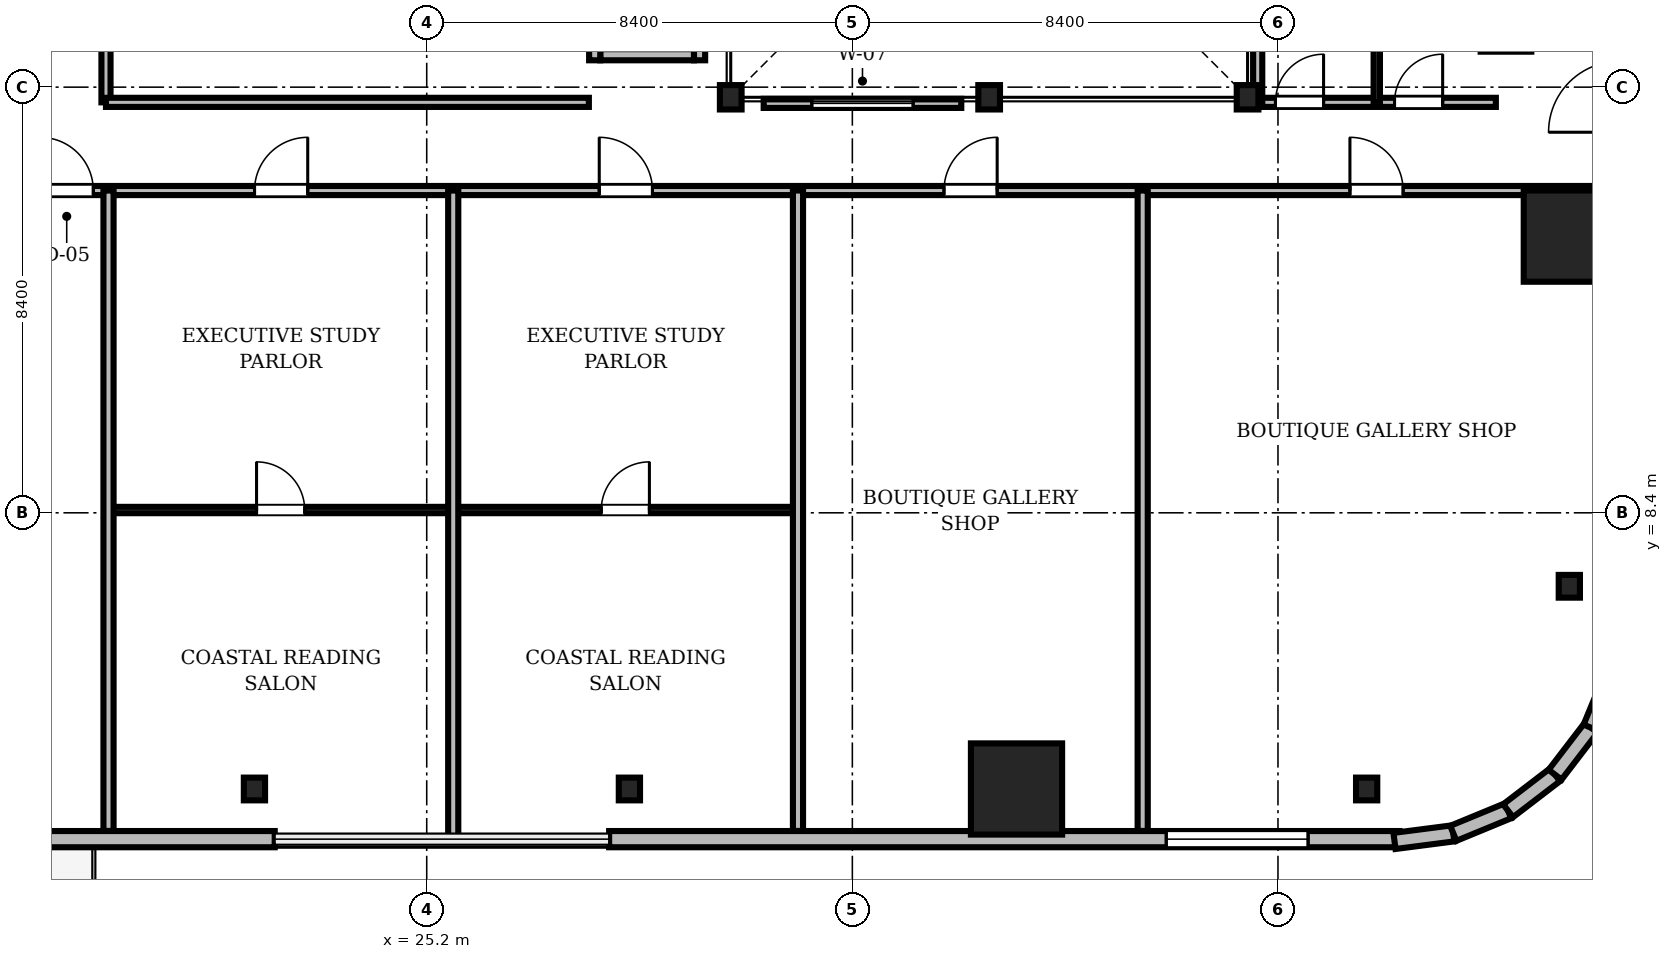
"""IFC4 building model, lengths in metres.
Left out: names, types, materials, properties, quantities, classifications, styles, units other than length and angle.
Written with IfcOpenShell. Run it as: python <this file> out.ifc"""

import sys

from ifc_helpers import new_model, si_unit, direction, frame, frame_2d, origin, origin_2d, place, context, subcontext, project, spatial, rectangle, i_section, extrude, source, transform, mapped, element, fill, save


model = new_model("IFC4")
c1 = context("Model", 3, precision=1e-05, world=origin(), true_north=direction((0.0, 1.0)))
c2 = subcontext(c1, "Body", "Model", "MODEL_VIEW")
j1 = project(units=[si_unit("LENGTHUNIT", "METRE"), si_unit("PLANEANGLEUNIT", "RADIAN")], contexts=[c1])
p1 = place(None, origin())
s1 = spatial("IfcSite", under=j1, at=p1, CompositionType="ELEMENT")
p2 = place(p1, origin())
s2 = spatial("IfcBuilding", under=s1, at=p2, CompositionType="ELEMENT")
p3 = place(p2, frame((0.0, 0.0, 78.7)))
s3 = spatial("IfcBuildingStorey", under=s2, at=p3, CompositionType="ELEMENT", Elevation=78.7)
m1 = source(origin(), c2, "Body", "SweptSolid", [
    extrude(i_section(OverallWidth=0.428, OverallDepth=0.481, WebThickness=0.04, FlangeThickness=0.063, FilletRadius=0.015, at=origin_2d()), origin(), (0.0, 0.0, 1.0), 3.41),
])
for number, where, z_axis, x_axis in (
    (1, (31.2, 16.6, 0.0), (0.0, 0.0, 1.0), (1.0, 0.0, 0.0)),
    (2, (36.3, 16.6, 0.0), (0.0, 0.0, 1.0), (1.0, 0.0, 0.0)),
    (3, (41.4, 16.6, 0.0), (0.0, 0.0, 1.0), (1.0, 0.0, 0.0)),
):
    element("IfcColumn", number, at=place(p3, frame(where, z_axis=z_axis, x_axis=x_axis)), inside=s3, PredefinedType="COLUMN", context=c2, shape_type="MappedRepresentation", body=[
        mapped(m1, transform((0.0, 0.0, 0.0), scale=1.0)),
    ])
m2 = source(origin(), c2, "Body", "SweptSolid", [
    extrude(rectangle(XDim=1.8, YDim=1.8, at=origin_2d()), origin(), (0.0, 0.0, 1.0), 3.41),
])
for number, where, z_axis, x_axis in (
    (4, (36.84, 2.95, 0.0), (0.0, 0.0, 1.0), (1.0, 0.0, 0.0)),
    (5, (47.75, 13.86, 0.0), (0.0, 0.0, 1.0), (1.0, 0.0, 0.0)),
):
    element("IfcColumn", number, at=place(p3, frame(where, z_axis=z_axis, x_axis=x_axis)), inside=s3, PredefinedType="COLUMN", context=c2, shape_type="MappedRepresentation", body=[
        mapped(m2, transform((0.0, 0.0, 0.0), scale=1.0)),
    ])
m3 = source(origin(), c2, "Body", "SweptSolid", [
    extrude(i_section(OverallWidth=0.419, OverallDepth=0.449, WebThickness=0.031, FlangeThickness=0.048, FilletRadius=0.015, at=origin_2d()), origin(), (0.0, 0.0, 1.0), 3.41),
])
for number, where, z_axis, x_axis in (
    (6, (21.8, 2.95, 0.0), (0.0, 0.0, 1.0), (1.0, 0.0, 0.0)),
    (7, (29.2, 2.95, 0.0), (0.0, 0.0, 1.0), (1.0, 0.0, 0.0)),
    (8, (43.75, 2.95, 0.0), (0.0, 0.0, 1.0), (1.0, 0.0, 0.0)),
    (9, (47.75, 6.95, 0.0), (0.0, 0.0, 1.0), (1.0, 0.0, 0.0)),
):
    element("IfcColumn", number, at=place(p3, frame(where, z_axis=z_axis, x_axis=x_axis)), inside=s3, PredefinedType="COLUMN", context=c2, shape_type="MappedRepresentation", body=[
        mapped(m3, transform((0.0, 0.0, 0.0), scale=1.0)),
    ])
m4 = source(origin(), c2, "Body", "SweptSolid", [
    extrude(rectangle(XDim=15.6, YDim=0.32, at=frame_2d((7.8, 0.0))), origin(), (0.0, 0.0, 1.0), 3.41),
])
p4 = place(p3, frame((6.6, 1.96, 0.0), z_axis=(0.0, 0.0, 1.0), x_axis=(1.0, 0.0, 0.0)))
e10 = element("IfcWall", 10, at=p4, inside=s3, PredefinedType="SOLIDWALL", context=c2, shape_type="MappedRepresentation", body=[
    mapped(m4, transform((0.0, 0.0, 0.0), scale=1.0)),
])
m5 = source(origin(), c2, "Body", "SweptSolid", [
    extrude(rectangle(XDim=1.4, YDim=2.3, at=frame_2d((0.7, 1.15))), frame((0.0, 0.17, 0.0), z_axis=(0.0, -1.0, 0.0), x_axis=(1.0, 0.0, 0.0)), (0.0, 0.0, 1.0), 0.34),
])
p5 = place(p4, frame((9.61, 0.0, 0.0)))
e11 = element("IfcOpeningElement", 11, at=p5, cuts=e10, PredefinedType="OPENING", context=c2, shape_type="MappedRepresentation", body=[
    mapped(m5, transform((0.0, 0.0, 0.0), scale=1.0)),
])
m6 = source(origin(), c2, "Body", "SweptSolid", [
    extrude(rectangle(XDim=2.8, YDim=2.4, at=frame_2d((1.4, 1.2))), frame((0.0, 0.17, 0.0), z_axis=(0.0, -1.0, 0.0), x_axis=(1.0, 0.0, 0.0)), (0.0, 0.0, 1.0), 0.34),
])
p6 = place(p4, frame((2.705, 0.0, 0.72)))
e12 = element("IfcOpeningElement", 12, at=p6, cuts=e10, PredefinedType="OPENING", context=c2, shape_type="MappedRepresentation", body=[
    mapped(m6, transform((0.0, 0.0, 0.0), scale=1.0)),
])
p7 = place(p3, frame((28.8, 1.96, 0.0), z_axis=(0.0, 0.0, 1.0), x_axis=(1.0, 0.0, 0.0)))
e13 = element("IfcWall", 13, at=p7, inside=s3, PredefinedType="SOLIDWALL", context=c2, shape_type="MappedRepresentation", body=[
    mapped(m4, transform((0.0, 0.0, 0.0), scale=1.0)),
])
p8 = place(p7, frame((10.995, 0.0, 0.72)))
e14 = element("IfcOpeningElement", 14, at=p8, cuts=e13, PredefinedType="OPENING", context=c2, shape_type="MappedRepresentation", body=[
    mapped(m6, transform((0.0, 0.0, 0.0), scale=1.0)),
])
m7 = source(origin(), c2, "Body", "SweptSolid", [
    extrude(rectangle(XDim=1.17, YDim=0.32, at=frame_2d((0.585, 0.0))), origin(), (0.0, 0.0, 1.0), 3.41),
])
p9 = place(p3, frame((44.3, 1.925, 0.0), z_axis=(0.0, 0.0, 1.0), x_axis=(0.991762485493, 0.128090485085, 0.0)))
e15 = element("IfcWall", 15, at=p9, inside=s3, PredefinedType="SOLIDWALL", context=c2, shape_type="MappedRepresentation", body=[
    mapped(m7, transform((0.0, 0.0, 0.0), scale=1.0)),
])
m8 = source(origin(), c2, "Body", "SweptSolid", [
    extrude(rectangle(XDim=1.169, YDim=0.32, at=frame_2d((0.585, 0.0))), origin(), (0.0, 0.0, 1.0), 3.41),
])
p10 = place(p3, frame((45.46, 2.074, 0.0), z_axis=(0.0, 0.0, 1.0), x_axis=(0.924479075121, 0.381232789334, 0.0)))
e16 = element("IfcWall", 16, at=p10, inside=s3, PredefinedType="SOLIDWALL", context=c2, shape_type="MappedRepresentation", body=[
    mapped(m8, transform((0.0, 0.0, 0.0), scale=1.0)),
])
m9 = source(origin(), c2, "Body", "SweptSolid", [
    extrude(rectangle(XDim=1.169, YDim=0.32, at=frame_2d((0.584, 0.0))), origin(), (0.0, 0.0, 1.0), 3.41),
])
p11 = place(p3, frame((46.541, 2.52, 0.0), z_axis=(0.0, 0.0, 1.0), x_axis=(0.793663520347, 0.608356981114, 0.0)))
e17 = element("IfcWall", 17, at=p11, inside=s3, PredefinedType="SOLIDWALL", context=c2, shape_type="MappedRepresentation", body=[
    mapped(m9, transform((0.0, 0.0, 0.0), scale=1.0)),
])
m10 = source(origin(), c2, "Body", "SweptSolid", [
    extrude(rectangle(XDim=1.169, YDim=0.32, at=frame_2d((0.584, 0.0))), origin(), (0.0, 0.0, 1.0), 3.41),
])
for number, where, z_axis, x_axis in (
    (18, (47.469, 3.231, 0.0), (0.0, 0.0, 1.0), (0.608, 0.794, 0.0)),
    (19, (48.18, 4.159, 0.0), (0.0, 0.0, 1.0), (0.381, 0.925, 0.0)),
):
    element("IfcWall", number, at=place(p3, frame(where, z_axis=z_axis, x_axis=x_axis)), inside=s3, PredefinedType="SOLIDWALL", context=c2, shape_type="MappedRepresentation", body=[
        mapped(m10, transform((0.0, 0.0, 0.0), scale=1.0)),
    ])
m11 = source(origin(), c2, "Body", "SweptSolid", [
    extrude(rectangle(XDim=1.85, YDim=0.22, at=frame_2d((0.925, 0.0))), origin(), (0.0, 0.0, 1.0), 3.41),
])
p12 = place(p3, frame((28.625, 17.44, 0.0), z_axis=(0.0, 0.0, 1.0), x_axis=(1.0, 0.0, 0.0)))
e20 = element("IfcWall", 20, at=p12, inside=s3, PredefinedType="SOLIDWALL", context=c2, shape_type="MappedRepresentation", body=[
    mapped(m11, transform((0.0, 0.0, 0.0), scale=1.0)),
])
m12 = source(origin(), c2, "Body", "SweptSolid", [
    extrude(rectangle(XDim=2.54, YDim=0.22, at=frame_2d((1.27, 0.0))), origin(), (0.0, 0.0, 1.0), 3.41),
])
for number, where, z_axis, x_axis in (
    (21, (28.515, 17.33, 0.0), (0.0, 0.0, 1.0), (0.0, 1.0, 0.0)),
    (22, (30.585, 17.33, 0.0), (0.0, 0.0, 1.0), (0.0, 1.0, 0.0)),
):
    element("IfcWall", number, at=place(p3, frame(where, z_axis=z_axis, x_axis=x_axis)), inside=s3, PredefinedType="SOLIDWALL", context=c2, shape_type="MappedRepresentation", body=[
        mapped(m12, transform((0.0, 0.0, 0.0), scale=1.0)),
    ])
m13 = source(origin(), c2, "Body", "SweptSolid", [
    extrude(rectangle(XDim=46.156, YDim=0.18, at=frame_2d((23.078, 0.0))), origin(), (0.0, 0.0, 1.0), 2.652),
])
p13 = place(p3, frame((2.422, 14.76, 0.0), z_axis=(0.0, 0.0, 1.0), x_axis=(1.0, 0.0, 0.0)))
e23 = element("IfcWall", 23, at=p13, inside=s3, PredefinedType="PARTITIONING", context=c2, shape_type="MappedRepresentation", body=[
    mapped(m13, transform((0.0, 0.0, 0.0), scale=1.0)),
])
m14 = source(origin(), c2, "Body", "SweptSolid", [
    extrude(rectangle(XDim=1.05, YDim=2.2, at=frame_2d((0.525, 1.1))), frame((0.0, 0.1, 0.0), z_axis=(0.0, -1.0, 0.0), x_axis=(1.0, 0.0, 0.0)), (0.0, 0.0, 1.0), 0.2),
])
p14 = place(p13, frame((15.148, 0.0, 0.0)))
e24 = element("IfcOpeningElement", 24, at=p14, cuts=e23, PredefinedType="OPENING", context=c2, shape_type="MappedRepresentation", body=[
    mapped(m14, transform((0.0, 0.0, 0.0), scale=1.0)),
])
p15 = place(p13, frame((19.38, 0.0, 0.0)))
e25 = element("IfcOpeningElement", 25, at=p15, cuts=e23, PredefinedType="OPENING", context=c2, shape_type="MappedRepresentation", body=[
    mapped(m14, transform((0.0, 0.0, 0.0), scale=1.0)),
])
p16 = place(p13, frame((26.183, 0.0, 0.0)))
e26 = element("IfcOpeningElement", 26, at=p16, cuts=e23, PredefinedType="OPENING", context=c2, shape_type="MappedRepresentation", body=[
    mapped(m14, transform((0.0, 0.0, 0.0), scale=1.0)),
])
p17 = place(p13, frame((32.986, 0.0, 0.0)))
e27 = element("IfcOpeningElement", 27, at=p17, cuts=e23, PredefinedType="OPENING", context=c2, shape_type="MappedRepresentation", body=[
    mapped(m14, transform((0.0, 0.0, 0.0), scale=1.0)),
])
p18 = place(p13, frame((40.998, 0.0, 0.0)))
e28 = element("IfcOpeningElement", 28, at=p18, cuts=e23, PredefinedType="OPENING", context=c2, shape_type="MappedRepresentation", body=[
    mapped(m14, transform((0.0, 0.0, 0.0), scale=1.0)),
])
m15 = source(origin(), c2, "Body", "SweptSolid", [
    extrude(rectangle(XDim=6.804, YDim=0.125, at=frame_2d((3.402, 0.0))), origin(), (0.0, 0.0, 1.0), 2.802),
])
p19 = place(p3, frame((25.723, 8.455, 0.0), z_axis=(0.0, 0.0, 1.0), x_axis=(1.0, 0.0, 0.0)))
e29 = element("IfcWall", 29, at=p19, inside=s3, PredefinedType="PARTITIONING", context=c2, shape_type="MappedRepresentation", body=[
    mapped(m15, transform((0.0, 0.0, 0.0), scale=1.0)),
])
m16 = source(origin(), c2, "Body", "SweptSolid", [
    extrude(rectangle(XDim=0.95, YDim=2.15, at=frame_2d((0.475, 1.075))), frame((0.0, 0.073, 0.0), z_axis=(0.0, -1.0, 0.0), x_axis=(1.0, 0.0, 0.0)), (0.0, 0.0, 1.0), 0.145),
])
p20 = place(p19, frame((2.922, 0.0, 0.0)))
e30 = element("IfcOpeningElement", 30, at=p20, cuts=e29, PredefinedType="OPENING", context=c2, shape_type="MappedRepresentation", body=[
    mapped(m16, transform((0.0, 0.0, 0.0), scale=1.0)),
])
m17 = source(origin(), c2, "Body", "SweptSolid", [
    extrude(rectangle(XDim=6.803, YDim=0.125, at=frame_2d((3.401, 0.0))), origin(), (0.0, 0.0, 1.0), 2.802),
])
p21 = place(p3, frame((18.92, 8.455, 0.0), z_axis=(0.0, 0.0, 1.0), x_axis=(1.0, 0.0, 0.0)))
e31 = element("IfcWall", 31, at=p21, inside=s3, PredefinedType="PARTITIONING", context=c2, shape_type="MappedRepresentation", body=[
    mapped(m17, transform((0.0, 0.0, 0.0), scale=1.0)),
])
p22 = place(p21, frame((2.922, 0.0, 0.0)))
e32 = element("IfcOpeningElement", 32, at=p22, cuts=e31, PredefinedType="OPENING", context=c2, shape_type="MappedRepresentation", body=[
    mapped(m16, transform((0.0, 0.0, 0.0), scale=1.0)),
])
m18 = source(origin(), c2, "Body", "SweptSolid", [
    extrude(rectangle(XDim=4.7, YDim=0.18, at=frame_2d((2.35, 0.0))), origin(), (0.0, 0.0, 1.0), 2.802),
])
p23 = place(p3, frame((41.6, 16.5, 0.0), z_axis=(0.0, 0.0, 1.0), x_axis=(1.0, 0.0, 0.0)))
e33 = element("IfcWall", 33, at=p23, inside=s3, PredefinedType="PARTITIONING", context=c2, shape_type="MappedRepresentation", body=[
    mapped(m18, transform((0.0, 0.0, 0.0), scale=1.0)),
])
m19 = source(origin(), c2, "Body", "SweptSolid", [
    extrude(rectangle(XDim=0.95, YDim=2.15, at=frame_2d((0.475, 1.075))), frame((0.0, 0.1, 0.0), z_axis=(0.0, -1.0, 0.0), x_axis=(1.0, 0.0, 0.0)), (0.0, 0.0, 1.0), 0.2),
])
p24 = place(p23, frame((0.35, 0.0, 0.0)))
e34 = element("IfcOpeningElement", 34, at=p24, cuts=e33, PredefinedType="OPENING", context=c2, shape_type="MappedRepresentation", body=[
    mapped(m19, transform((0.0, 0.0, 0.0), scale=1.0)),
])
p25 = place(p23, frame((2.7, 0.0, 0.0)))
e35 = element("IfcOpeningElement", 35, at=p25, cuts=e33, PredefinedType="OPENING", context=c2, shape_type="MappedRepresentation", body=[
    mapped(m19, transform((0.0, 0.0, 0.0), scale=1.0)),
])
m20 = source(origin(), c2, "Body", "SweptSolid", [
    extrude(rectangle(XDim=3.55, YDim=0.18, at=frame_2d((1.775, 0.0))), origin(), (0.0, 0.0, 1.0), 2.802),
])
p26 = place(p3, frame((18.87, 16.5, 0.0), z_axis=(0.0, 0.0, 1.0), x_axis=(0.0, 1.0, 0.0)))
e36 = element("IfcWall", 36, at=p26, inside=s3, PredefinedType="PARTITIONING", context=c2, shape_type="MappedRepresentation", body=[
    mapped(m20, transform((0.0, 0.0, 0.0), scale=1.0)),
])
p27 = place(p26, frame((1.15, 0.0, 0.0)))
e37 = element("IfcOpeningElement", 37, at=p27, cuts=e36, PredefinedType="OPENING", context=c2, shape_type="MappedRepresentation", body=[
    mapped(m14, transform((0.0, 0.0, 0.0), scale=1.0)),
])
m21 = source(origin(), c2, "Body", "SweptSolid", [
    extrude(rectangle(XDim=12.638, YDim=0.2, at=frame_2d((6.319, 0.0))), origin(), (0.0, 0.0, 1.0), 2.652),
])
p28 = place(p3, frame((18.92, 2.122, 0.0), z_axis=(0.0, 0.0, 1.0), x_axis=(0.0, 1.0, 0.0)))
e38 = element("IfcWall", 38, at=p28, inside=s3, PredefinedType="PARTITIONING", context=c2, shape_type="MappedRepresentation", body=[
    mapped(m21, transform((0.0, 0.0, 0.0), scale=1.0)),
])
m22 = source(origin(), c2, "Body", "SweptSolid", [
    extrude(rectangle(XDim=12.83, YDim=0.2, at=frame_2d((6.415, 0.0))), origin(), (0.0, 0.0, 1.0), 2.652),
])
p29 = place(p3, frame((25.723, 1.93, 0.0), z_axis=(0.0, 0.0, 1.0), x_axis=(0.0, 1.0, 0.0)))
e39 = element("IfcWall", 39, at=p29, inside=s3, PredefinedType="PARTITIONING", context=c2, shape_type="MappedRepresentation", body=[
    mapped(m22, transform((0.0, 0.0, 0.0), scale=1.0)),
])
for number, where, z_axis, x_axis in (
    (40, (32.527, 2.122, 0.0), (0.0, 0.0, 1.0), (0.0, 1.0, 0.0)),
    (41, (39.33, 2.122, 0.0), (0.0, 0.0, 1.0), (0.0, 1.0, 0.0)),
):
    element("IfcWall", number, at=place(p3, frame(where, z_axis=z_axis, x_axis=x_axis)), inside=s3, PredefinedType="PARTITIONING", context=c2, shape_type="MappedRepresentation", body=[
        mapped(m21, transform((0.0, 0.0, 0.0), scale=1.0)),
    ])
m23 = source(origin(), c2, "Body", "SweptSolid", [
    extrude(rectangle(XDim=9.53, YDim=0.18, at=frame_2d((4.765, 0.0))), origin(), (0.0, 0.0, 1.0), 2.802),
])
p30 = place(p3, frame((18.87, 16.5, 0.0), z_axis=(0.0, 0.0, 1.0), x_axis=(1.0, 0.0, 0.0)))
e42 = element("IfcWall", 42, at=p30, inside=s3, PredefinedType="PARTITIONING", context=c2, shape_type="MappedRepresentation", body=[
    mapped(m23, transform((0.0, 0.0, 0.0), scale=1.0)),
])
m24 = source(origin(), c2, "Body", "SweptSolid", [
    extrude(rectangle(XDim=7.15, YDim=0.18, at=frame_2d((3.575, 0.0))), origin(), (0.0, 0.0, 1.0), 2.802),
])
p31 = place(p3, frame((41.6, 16.5, 0.0), z_axis=(0.0, 0.0, 1.0), x_axis=(0.0, 1.0, 0.0)))
e43 = element("IfcWall", 43, at=p31, inside=s3, PredefinedType="PARTITIONING", context=c2, shape_type="MappedRepresentation", body=[
    mapped(m24, transform((0.0, 0.0, 0.0), scale=1.0)),
])
m25 = source(origin(), c2, "Body", "SweptSolid", [
    extrude(rectangle(XDim=7.15, YDim=0.125, at=frame_2d((3.575, 0.0))), origin(), (0.0, 0.0, 1.0), 2.802),
])
p32 = place(p3, frame((43.95, 16.5, 0.0), z_axis=(0.0, 0.0, 1.0), x_axis=(0.0, 1.0, 0.0)))
e44 = element("IfcWall", 44, at=p32, inside=s3, PredefinedType="PARTITIONING", context=c2, shape_type="MappedRepresentation", body=[
    mapped(m25, transform((0.0, 0.0, 0.0), scale=1.0)),
])
m26 = source(origin(), c2, "Body", "SweptSolid", [
    extrude(rectangle(XDim=3.9, YDim=0.18, at=frame_2d((1.95, 0.0))), origin(), (0.0, 0.0, 1.0), 2.952),
])
p33 = place(p3, frame((31.85, 16.48, 0.0), z_axis=(0.0, 0.0, 1.0), x_axis=(1.0, 0.0, 0.0)))
e45 = element("IfcWall", 45, at=p33, inside=s3, PredefinedType="PARTITIONING", context=c2, shape_type="MappedRepresentation", body=[
    mapped(m26, transform((0.0, 0.0, 0.0), scale=1.0)),
])
m27 = source(origin(), c2, "Body", "SweptSolid", [
    extrude(rectangle(XDim=2.0, YDim=1.9, at=frame_2d((1.0, 0.95))), frame((0.0, 0.1, 0.0), z_axis=(0.0, -1.0, 0.0), x_axis=(1.0, 0.0, 0.0)), (0.0, 0.0, 1.0), 0.2),
])
p34 = place(p33, frame((0.95, 0.0, 0.55)))
e46 = element("IfcOpeningElement", 46, at=p34, cuts=e45, PredefinedType="OPENING", context=c2, shape_type="MappedRepresentation", body=[
    mapped(m27, transform((0.0, 0.0, 0.0), scale=1.0)),
])
m28 = source(origin(), c2, "Body", "SweptSolid", [
    extrude(rectangle(XDim=2.8, YDim=2.4, at=frame_2d((1.4, 1.2))), frame((0.0, 0.03, 0.0), z_axis=(0.0, -1.0, 0.0), x_axis=(1.0, 0.0, 0.0)), (0.0, 0.0, 1.0), 0.06),
])
p35 = place(p8, origin())
e47 = element("IfcWindow", 47, at=p35, inside=s3, PartitioningType="SINGLE_PANEL", PredefinedType="WINDOW", context=c2, shape_type="MappedRepresentation", body=[
    mapped(m28, transform((0.0, 0.0, 0.0), scale=1.0)),
])
fill(e14, e47)
m29 = source(origin(), c2, "Body", "SweptSolid", [
    extrude(rectangle(XDim=1.05, YDim=2.2, at=frame_2d((0.525, 1.1))), frame((0.0, 0.025, 0.0), z_axis=(0.0, -1.0, 0.0), x_axis=(1.0, 0.0, 0.0)), (0.0, 0.0, 1.0), 0.05),
])
p36 = place(p14, origin())
e48 = element("IfcDoor", 48, at=p36, inside=s3, OperationType="SINGLE_SWING_LEFT", PredefinedType="DOOR", context=c2, shape_type="MappedRepresentation", body=[
    mapped(m29, transform((0.0, 0.0, 0.0), scale=1.0)),
])
fill(e24, e48)
p37 = place(p15, origin())
e49 = element("IfcDoor", 49, at=p37, inside=s3, OperationType="SINGLE_SWING_RIGHT", PredefinedType="DOOR", context=c2, shape_type="MappedRepresentation", body=[
    mapped(m29, transform((0.0, 0.0, 0.0), scale=1.0)),
])
fill(e25, e49)
p38 = place(p16, origin())
e50 = element("IfcDoor", 50, at=p38, inside=s3, OperationType="SINGLE_SWING_LEFT", PredefinedType="DOOR", context=c2, shape_type="MappedRepresentation", body=[
    mapped(m29, transform((0.0, 0.0, 0.0), scale=1.0)),
])
fill(e26, e50)
p39 = place(p17, origin())
e51 = element("IfcDoor", 51, at=p39, inside=s3, OperationType="SINGLE_SWING_RIGHT", PredefinedType="DOOR", context=c2, shape_type="MappedRepresentation", body=[
    mapped(m29, transform((0.0, 0.0, 0.0), scale=1.0)),
])
fill(e27, e51)
p40 = place(p18, origin())
e52 = element("IfcDoor", 52, at=p40, inside=s3, OperationType="SINGLE_SWING_LEFT", PredefinedType="DOOR", context=c2, shape_type="MappedRepresentation", body=[
    mapped(m29, transform((0.0, 0.0, 0.0), scale=1.0)),
])
fill(e28, e52)
m30 = source(origin(), c2, "Body", "SweptSolid", [
    extrude(rectangle(XDim=0.95, YDim=2.15, at=frame_2d((0.475, 1.075))), frame((0.0, 0.025, 0.0), z_axis=(0.0, -1.0, 0.0), x_axis=(1.0, 0.0, 0.0)), (0.0, 0.0, 1.0), 0.05),
])
p41 = place(p20, origin())
e53 = element("IfcDoor", 53, at=p41, inside=s3, OperationType="SINGLE_SWING_RIGHT", PredefinedType="DOOR", context=c2, shape_type="MappedRepresentation", body=[
    mapped(m30, transform((0.0, 0.0, 0.0), scale=1.0)),
])
fill(e30, e53)
p42 = place(p22, origin())
e54 = element("IfcDoor", 54, at=p42, inside=s3, OperationType="SINGLE_SWING_LEFT", PredefinedType="DOOR", context=c2, shape_type="MappedRepresentation", body=[
    mapped(m30, transform((0.0, 0.0, 0.0), scale=1.0)),
])
fill(e32, e54)
p43 = place(p24, origin())
e55 = element("IfcDoor", 55, at=p43, inside=s3, OperationType="SINGLE_SWING_RIGHT", PredefinedType="DOOR", context=c2, shape_type="MappedRepresentation", body=[
    mapped(m30, transform((0.0, 0.0, 0.0), scale=1.0)),
])
fill(e34, e55)
p44 = place(p25, origin())
e56 = element("IfcDoor", 56, at=p44, inside=s3, OperationType="SINGLE_SWING_RIGHT", PredefinedType="DOOR", context=c2, shape_type="MappedRepresentation", body=[
    mapped(m30, transform((0.0, 0.0, 0.0), scale=1.0)),
])
fill(e35, e56)
m31 = source(origin(), c2, "Body", "SweptSolid", [
    extrude(rectangle(XDim=2.0, YDim=1.9, at=frame_2d((1.0, 0.95))), frame((0.0, 0.03, 0.0), z_axis=(0.0, -1.0, 0.0), x_axis=(1.0, 0.0, 0.0)), (0.0, 0.0, 1.0), 0.06),
])
p45 = place(p34, origin())
e57 = element("IfcWindow", 57, at=p45, inside=s3, PartitioningType="SINGLE_PANEL", PredefinedType="WINDOW", context=c2, shape_type="MappedRepresentation", body=[
    mapped(m31, transform((0.0, 0.0, 0.0), scale=1.0)),
])
fill(e46, e57)
save(model, sys.argv[1])
